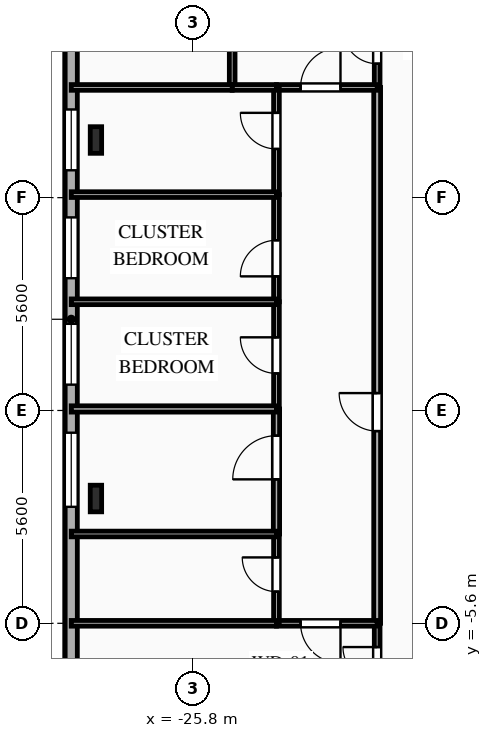
"""IFC4 building model, lengths in metres.
Left out: names, types, materials, properties, quantities, classifications, styles, units other than length and angle.
Written with IfcOpenShell. Run it as: python <this file> out.ifc"""

import sys

from ifc_helpers import new_model, si_unit, direction, frame, frame_2d, origin, origin_2d, place, context, subcontext, project, spatial, rectangle, i_section, extrude, element, fill, save


model = new_model("IFC4")
c1 = context("Model", 3, precision=1e-05, world=origin(), true_north=direction((0.0, 1.0)))
c2 = subcontext(c1, "Body", "Model", "MODEL_VIEW")
j1 = project(units=[si_unit("LENGTHUNIT", "METRE"), si_unit("PLANEANGLEUNIT", "RADIAN")], contexts=[c1])
p1 = place(None, origin())
s1 = spatial("IfcSite", under=j1, at=p1, CompositionType="ELEMENT")
p2 = place(p1, origin())
s2 = spatial("IfcBuilding", under=s1, at=p2, CompositionType="ELEMENT")
p3 = place(p2, frame((0.0, 0.0, 167.85)))
s3 = spatial("IfcBuildingStorey", under=s2, at=p3, CompositionType="ELEMENT", Elevation=167.85)
for number, where, z_axis, x_axis in (
    (1, (-28.35, 7.117, 0.0), (0.0, 0.0, 1.0), (1.0, 0.0, 0.0)),
    (2, (-28.35, -2.317, 0.0), (0.0, 0.0, 1.0), (1.0, 0.0, 0.0)),
):
    element("IfcColumn", number, at=place(p3, frame(where, z_axis=z_axis, x_axis=x_axis)), inside=s3, PredefinedType="COLUMN", context=c2, shape_type="SweptSolid", body=[
        extrude(i_section(OverallWidth=0.3, OverallDepth=0.7, WebThickness=0.017, FlangeThickness=0.032, FilletRadius=0.027, at=origin_2d()), origin(), (0.0, 0.0, 1.0), 3.35),
    ])
p4 = place(p3, frame((-29.0, -12.4, 0.0), z_axis=(0.0, 0.0, 1.0), x_axis=(0.0, 1.0, 0.0)))
e3 = element("IfcWall", 3, at=p4, inside=s3, PredefinedType="SOLIDWALL", context=c2, shape_type="SweptSolid", body=[
    extrude(rectangle(XDim=29.6, YDim=0.32, at=frame_2d((14.8, 0.0))), origin(), (0.0, 0.0, 1.0), 3.04),
])
p5 = place(p4, frame((2.855, 0.0, 0.85)))
e4 = element("IfcOpeningElement", 4, at=p5, cuts=e3, PredefinedType="OPENING", context=c2, shape_type="SweptSolid", body=[
    extrude(rectangle(XDim=1.65, YDim=1.85, at=frame_2d((0.825, 0.925))), frame((0.0, 0.17, 0.0), z_axis=(0.0, -1.0, 0.0), x_axis=(1.0, 0.0, 0.0)), (0.0, 0.0, 1.0), 0.34),
])
p6 = place(p4, frame((9.865, 0.0, 0.85)))
e5 = element("IfcOpeningElement", 5, at=p6, cuts=e3, PredefinedType="OPENING", context=c2, shape_type="SweptSolid", body=[
    extrude(rectangle(XDim=1.95, YDim=1.85, at=frame_2d((0.975, 0.925))), frame((0.0, 0.17, 0.0), z_axis=(0.0, -1.0, 0.0), x_axis=(1.0, 0.0, 0.0)), (0.0, 0.0, 1.0), 0.34),
])
p7 = place(p4, frame((13.08, 0.0, 0.85)))
e6 = element("IfcOpeningElement", 6, at=p7, cuts=e3, PredefinedType="OPENING", context=c2, shape_type="SweptSolid", body=[
    extrude(rectangle(XDim=1.6, YDim=1.85, at=frame_2d((0.8, 0.925))), frame((0.0, 0.17, 0.0), z_axis=(0.0, -1.0, 0.0), x_axis=(1.0, 0.0, 0.0)), (0.0, 0.0, 1.0), 0.34),
])
p8 = place(p4, frame((15.88, 0.0, 0.85)))
e7 = element("IfcOpeningElement", 7, at=p8, cuts=e3, PredefinedType="OPENING", context=c2, shape_type="SweptSolid", body=[
    extrude(rectangle(XDim=1.6, YDim=1.85, at=frame_2d((0.8, 0.925))), frame((0.0, 0.17, 0.0), z_axis=(0.0, -1.0, 0.0), x_axis=(1.0, 0.0, 0.0)), (0.0, 0.0, 1.0), 0.34),
])
p9 = place(p4, frame((18.72, 0.0, 0.85)))
e8 = element("IfcOpeningElement", 8, at=p9, cuts=e3, PredefinedType="OPENING", context=c2, shape_type="SweptSolid", body=[
    extrude(rectangle(XDim=1.6, YDim=1.85, at=frame_2d((0.8, 0.925))), frame((0.0, 0.17, 0.0), z_axis=(0.0, -1.0, 0.0), x_axis=(1.0, 0.0, 0.0)), (0.0, 0.0, 1.0), 0.34),
])
p10 = place(p4, frame((24.255, 0.0, 0.85)))
e9 = element("IfcOpeningElement", 9, at=p10, cuts=e3, PredefinedType="OPENING", context=c2, shape_type="SweptSolid", body=[
    extrude(rectangle(XDim=1.65, YDim=1.85, at=frame_2d((0.825, 0.925))), frame((0.0, 0.17, 0.0), z_axis=(0.0, -1.0, 0.0), x_axis=(1.0, 0.0, 0.0)), (0.0, 0.0, 1.0), 0.34),
])
p11 = place(p3, frame((-20.95, 8.5, 0.0), z_axis=(0.0, 0.0, 1.0), x_axis=(0.0, 1.0, 0.0)))
e10 = element("IfcWall", 10, at=p11, inside=s3, PredefinedType="PARTITIONING", context=c2, shape_type="SweptSolid", body=[
    extrude(rectangle(XDim=2.15, YDim=0.15, at=frame_2d((1.075, 0.0))), origin(), (0.0, 0.0, 1.0), 3.04),
])
p12 = place(p11, frame((0.625, 0.0, 0.0)))
e11 = element("IfcOpeningElement", 11, at=p12, cuts=e10, PredefinedType="OPENING", context=c2, shape_type="SweptSolid", body=[
    extrude(rectangle(XDim=0.9, YDim=2.1, at=frame_2d((0.45, 1.05))), frame((0.0, 0.085, 0.0), z_axis=(0.0, -1.0, 0.0), x_axis=(1.0, 0.0, 0.0)), (0.0, 0.0, 1.0), 0.17),
])
p13 = place(p3, frame((-20.95, -7.75, 0.0), z_axis=(0.0, 0.0, 1.0), x_axis=(0.0, 1.0, 0.0)))
e12 = element("IfcWall", 12, at=p13, inside=s3, PredefinedType="PARTITIONING", context=c2, shape_type="SweptSolid", body=[
    extrude(rectangle(XDim=2.15, YDim=0.15, at=frame_2d((1.075, 0.0))), origin(), (0.0, 0.0, 1.0), 3.04),
])
p14 = place(p13, frame((0.625, 0.0, 0.0)))
e13 = element("IfcOpeningElement", 13, at=p14, cuts=e12, PredefinedType="OPENING", context=c2, shape_type="SweptSolid", body=[
    extrude(rectangle(XDim=0.9, YDim=2.1, at=frame_2d((0.45, 1.05))), frame((0.0, 0.085, 0.0), z_axis=(0.0, -1.0, 0.0), x_axis=(1.0, 0.0, 0.0)), (0.0, 0.0, 1.0), 0.17),
])
p15 = place(p3, frame((-20.95, -5.6, 0.0), z_axis=(0.0, 0.0, 1.0), x_axis=(0.0, 1.0, 0.0)))
e14 = element("IfcWall", 14, at=p15, inside=s3, PredefinedType="PARTITIONING", context=c2, shape_type="SweptSolid", body=[
    extrude(rectangle(XDim=14.1, YDim=0.18, at=frame_2d((7.05, 0.0))), origin(), (0.0, 0.0, 1.0), 3.04),
])
p16 = place(p15, frame((5.058, 0.0, 0.0)))
e15 = element("IfcOpeningElement", 15, at=p16, cuts=e14, PredefinedType="OPENING", context=c2, shape_type="SweptSolid", body=[
    extrude(rectangle(XDim=1.0, YDim=2.15, at=frame_2d((0.5, 1.075))), frame((0.0, 0.1, 0.0), z_axis=(0.0, -1.0, 0.0), x_axis=(1.0, 0.0, 0.0)), (0.0, 0.0, 1.0), 0.2),
])
p17 = place(p3, frame((-23.6, 8.5, 0.0), z_axis=(0.0, 0.0, 1.0), x_axis=(1.0, 0.0, 0.0)))
e16 = element("IfcWall", 16, at=p17, inside=s3, PredefinedType="PARTITIONING", context=c2, shape_type="SweptSolid", body=[
    extrude(rectangle(XDim=2.65, YDim=0.15, at=frame_2d((1.325, 0.0))), origin(), (0.0, 0.0, 1.0), 3.04),
])
p18 = place(p17, frame((0.635, 0.0, 0.0)))
e17 = element("IfcOpeningElement", 17, at=p18, cuts=e16, PredefinedType="OPENING", context=c2, shape_type="SweptSolid", body=[
    extrude(rectangle(XDim=1.05, YDim=2.15, at=frame_2d((0.525, 1.075))), frame((0.0, 0.085, 0.0), z_axis=(0.0, -1.0, 0.0), x_axis=(1.0, 0.0, 0.0)), (0.0, 0.0, 1.0), 0.17),
])
p19 = place(p3, frame((-20.95, -5.6, 0.0), z_axis=(0.0, 0.0, 1.0), x_axis=(-1.0, 0.0, 0.0)))
e18 = element("IfcWall", 18, at=p19, inside=s3, PredefinedType="PARTITIONING", context=c2, shape_type="SweptSolid", body=[
    extrude(rectangle(XDim=2.65, YDim=0.15, at=frame_2d((1.325, 0.0))), origin(), (0.0, 0.0, 1.0), 3.04),
])
p20 = place(p19, frame((0.965, 0.0, 0.0)))
e19 = element("IfcOpeningElement", 19, at=p20, cuts=e18, PredefinedType="OPENING", context=c2, shape_type="SweptSolid", body=[
    extrude(rectangle(XDim=1.05, YDim=2.15, at=frame_2d((0.525, 1.075))), frame((0.0, 0.085, 0.0), z_axis=(0.0, -1.0, 0.0), x_axis=(1.0, 0.0, 0.0)), (0.0, 0.0, 1.0), 0.17),
])
p21 = place(p3, frame((-23.6, -5.6, 0.0), z_axis=(0.0, 0.0, 1.0), x_axis=(0.0, 1.0, 0.0)))
e20 = element("IfcWall", 20, at=p21, inside=s3, PredefinedType="PLUMBINGWALL", context=c2, shape_type="SweptSolid", body=[
    extrude(rectangle(XDim=2.35, YDim=0.15, at=frame_2d((1.175, 0.0))), origin(), (0.0, 0.0, 1.0), 2.695),
])
p22 = place(p21, frame((0.834, 0.0, 0.0)))
e21 = element("IfcOpeningElement", 21, at=p22, cuts=e20, PredefinedType="OPENING", context=c2, shape_type="SweptSolid", body=[
    extrude(rectangle(XDim=0.9, YDim=2.1, at=frame_2d((0.45, 1.05))), frame((0.0, 0.085, 0.0), z_axis=(0.0, -1.0, 0.0), x_axis=(1.0, 0.0, 0.0)), (0.0, 0.0, 1.0), 0.17),
])
p23 = place(p3, frame((-23.6, -3.25, 0.0), z_axis=(0.0, 0.0, 1.0), x_axis=(0.0, 1.0, 0.0)))
e22 = element("IfcWall", 22, at=p23, inside=s3, PredefinedType="PARTITIONING", context=c2, shape_type="SweptSolid", body=[
    extrude(rectangle(XDim=3.29, YDim=0.165, at=frame_2d((1.645, 0.0))), origin(), (0.0, 0.0, 1.0), 2.695),
])
p24 = place(p23, frame((1.438, 0.0, 0.0)))
e23 = element("IfcOpeningElement", 23, at=p24, cuts=e22, PredefinedType="OPENING", context=c2, shape_type="SweptSolid", body=[
    extrude(rectangle(XDim=1.15, YDim=2.15, at=frame_2d((0.575, 1.075))), frame((0.0, 0.093, 0.0), z_axis=(0.0, -1.0, 0.0), x_axis=(1.0, 0.0, 0.0)), (0.0, 0.0, 1.0), 0.185),
])
p25 = place(p3, frame((-23.6, 0.04, 0.0), z_axis=(0.0, 0.0, 1.0), x_axis=(0.0, 1.0, 0.0)))
e24 = element("IfcWall", 24, at=p25, inside=s3, PredefinedType="PARTITIONING", context=c2, shape_type="SweptSolid", body=[
    extrude(rectangle(XDim=2.82, YDim=0.15, at=frame_2d((1.41, 0.0))), origin(), (0.0, 0.0, 1.0), 2.695),
])
p26 = place(p25, frame((0.935, 0.0, 0.0)))
e25 = element("IfcOpeningElement", 25, at=p26, cuts=e24, PredefinedType="OPENING", context=c2, shape_type="SweptSolid", body=[
    extrude(rectangle(XDim=0.95, YDim=2.1, at=frame_2d((0.475, 1.05))), frame((0.0, 0.085, 0.0), z_axis=(0.0, -1.0, 0.0), x_axis=(1.0, 0.0, 0.0)), (0.0, 0.0, 1.0), 0.17),
])
p27 = place(p3, frame((-23.6, 2.86, 0.0), z_axis=(0.0, 0.0, 1.0), x_axis=(0.0, 1.0, 0.0)))
e26 = element("IfcWall", 26, at=p27, inside=s3, PredefinedType="PARTITIONING", context=c2, shape_type="SweptSolid", body=[
    extrude(rectangle(XDim=2.82, YDim=0.15, at=frame_2d((1.41, 0.0))), origin(), (0.0, 0.0, 1.0), 2.695),
])
p28 = place(p27, frame((0.669, 0.0, 0.0)))
e27 = element("IfcOpeningElement", 27, at=p28, cuts=e26, PredefinedType="OPENING", context=c2, shape_type="SweptSolid", body=[
    extrude(rectangle(XDim=0.95, YDim=2.1, at=frame_2d((0.475, 1.05))), frame((0.0, 0.085, 0.0), z_axis=(0.0, -1.0, 0.0), x_axis=(1.0, 0.0, 0.0)), (0.0, 0.0, 1.0), 0.17),
])
p29 = place(p3, frame((-23.6, 5.68, 0.0), z_axis=(0.0, 0.0, 1.0), x_axis=(0.0, 1.0, 0.0)))
e28 = element("IfcWall", 28, at=p29, inside=s3, PredefinedType="PARTITIONING", context=c2, shape_type="SweptSolid", body=[
    extrude(rectangle(XDim=2.82, YDim=0.15, at=frame_2d((1.41, 0.0))), origin(), (0.0, 0.0, 1.0), 2.695),
])
p30 = place(p29, frame((1.201, 0.0, 0.0)))
e29 = element("IfcOpeningElement", 29, at=p30, cuts=e28, PredefinedType="OPENING", context=c2, shape_type="SweptSolid", body=[
    extrude(rectangle(XDim=0.95, YDim=2.1, at=frame_2d((0.475, 1.05))), frame((0.0, 0.085, 0.0), z_axis=(0.0, -1.0, 0.0), x_axis=(1.0, 0.0, 0.0)), (0.0, 0.0, 1.0), 0.17),
])
p31 = place(p3, frame((-24.765, 8.5, 0.0), z_axis=(0.0, 0.0, 1.0), x_axis=(0.0, 1.0, 0.0)))
e30 = element("IfcWall", 30, at=p31, inside=s3, PredefinedType="PARTITIONING", context=c2, shape_type="SweptSolid", body=[
    extrude(rectangle(XDim=11.9, YDim=0.15, at=frame_2d((5.95, 0.0))), origin(), (0.0, 0.0, 1.0), 3.04),
])
p32 = place(p31, frame((3.002, 0.0, 0.0)))
e31 = element("IfcOpeningElement", 31, at=p32, cuts=e30, PredefinedType="OPENING", context=c2, shape_type="SweptSolid", body=[
    extrude(rectangle(XDim=1.05, YDim=2.15, at=frame_2d((0.525, 1.075))), frame((0.0, 0.085, 0.0), z_axis=(0.0, -1.0, 0.0), x_axis=(1.0, 0.0, 0.0)), (0.0, 0.0, 1.0), 0.17),
])
p33 = place(p3, frame((-23.6, 8.5, 0.0), z_axis=(0.0, 0.0, 1.0), x_axis=(-1.0, 0.0, 0.0)))
e32 = element("IfcWall", 32, at=p33, inside=s3, PredefinedType="PARTITIONING", context=c2, shape_type="SweptSolid", body=[
    extrude(rectangle(XDim=1.165, YDim=0.15, at=frame_2d((0.583, 0.0))), origin(), (0.0, 0.0, 1.0), 3.04),
])
p34 = place(p3, frame((-24.765, 8.5, 0.0), z_axis=(0.0, 0.0, 1.0), x_axis=(-1.0, 0.0, 0.0)))
e33 = element("IfcWall", 33, at=p34, inside=s3, PredefinedType="PARTITIONING", context=c2, shape_type="SweptSolid", body=[
    extrude(rectangle(XDim=4.235, YDim=0.15, at=frame_2d((2.118, 0.0))), origin(), (0.0, 0.0, 1.0), 3.04),
])
for number, where, z_axis, x_axis in (
    (34, (-29.0, -5.6, 0.0), (0.0, 0.0, 1.0), (1.0, 0.0, 0.0)),
    (35, (-29.0, -3.25, 0.0), (0.0, 0.0, 1.0), (1.0, 0.0, 0.0)),
):
    element("IfcWall", number, at=place(p3, frame(where, z_axis=z_axis, x_axis=x_axis)), inside=s3, PredefinedType="PLUMBINGWALL", context=c2, shape_type="SweptSolid", body=[
        extrude(rectangle(XDim=5.4, YDim=0.15, at=frame_2d((2.7, 0.0))), origin(), (0.0, 0.0, 1.0), 3.04),
    ])
p35 = place(p3, frame((-29.0, 0.04, 0.0), z_axis=(0.0, 0.0, 1.0), x_axis=(1.0, 0.0, 0.0)))
e36 = element("IfcWall", 36, at=p35, inside=s3, PredefinedType="PARTITIONING", context=c2, shape_type="SweptSolid", body=[
    extrude(rectangle(XDim=5.4, YDim=0.165, at=frame_2d((2.7, 0.0))), origin(), (0.0, 0.0, 1.0), 3.04),
])
for number, where, z_axis, x_axis in (
    (37, (-29.0, 2.86, 0.0), (0.0, 0.0, 1.0), (1.0, 0.0, 0.0)),
    (38, (-29.0, 5.68, 0.0), (0.0, 0.0, 1.0), (1.0, 0.0, 0.0)),
):
    element("IfcWall", number, at=place(p3, frame(where, z_axis=z_axis, x_axis=x_axis)), inside=s3, PredefinedType="PARTITIONING", context=c2, shape_type="SweptSolid", body=[
        extrude(rectangle(XDim=5.4, YDim=0.15, at=frame_2d((2.7, 0.0))), origin(), (0.0, 0.0, 1.0), 3.04),
    ])
p36 = place(p6, origin())
e39 = element("IfcWindow", 39, at=p36, inside=s3, PartitioningType="SINGLE_PANEL", PredefinedType="WINDOW", context=c2, shape_type="SweptSolid", body=[
    extrude(rectangle(XDim=1.95, YDim=1.85, at=frame_2d((0.975, 0.925))), frame((0.0, 0.03, 0.0), z_axis=(0.0, -1.0, 0.0), x_axis=(1.0, 0.0, 0.0)), (0.0, 0.0, 1.0), 0.06),
])
fill(e5, e39)
p37 = place(p7, origin())
e40 = element("IfcWindow", 40, at=p37, inside=s3, PartitioningType="SINGLE_PANEL", PredefinedType="WINDOW", context=c2, shape_type="SweptSolid", body=[
    extrude(rectangle(XDim=1.6, YDim=1.85, at=frame_2d((0.8, 0.925))), frame((0.0, 0.03, 0.0), z_axis=(0.0, -1.0, 0.0), x_axis=(1.0, 0.0, 0.0)), (0.0, 0.0, 1.0), 0.06),
])
fill(e6, e40)
p38 = place(p8, origin())
e41 = element("IfcWindow", 41, at=p38, inside=s3, PartitioningType="SINGLE_PANEL", PredefinedType="WINDOW", context=c2, shape_type="SweptSolid", body=[
    extrude(rectangle(XDim=1.6, YDim=1.85, at=frame_2d((0.8, 0.925))), frame((0.0, 0.03, 0.0), z_axis=(0.0, -1.0, 0.0), x_axis=(1.0, 0.0, 0.0)), (0.0, 0.0, 1.0), 0.06),
])
fill(e7, e41)
p39 = place(p9, origin())
e42 = element("IfcWindow", 42, at=p39, inside=s3, PartitioningType="SINGLE_PANEL", PredefinedType="WINDOW", context=c2, shape_type="SweptSolid", body=[
    extrude(rectangle(XDim=1.6, YDim=1.85, at=frame_2d((0.8, 0.925))), frame((0.0, 0.03, 0.0), z_axis=(0.0, -1.0, 0.0), x_axis=(1.0, 0.0, 0.0)), (0.0, 0.0, 1.0), 0.06),
])
fill(e8, e42)
p40 = place(p12, origin())
e43 = element("IfcDoor", 43, at=p40, inside=s3, OperationType="SINGLE_SWING_RIGHT", PredefinedType="DOOR", context=c2, shape_type="SweptSolid", body=[
    extrude(rectangle(XDim=0.9, YDim=2.1, at=frame_2d((0.45, 1.05))), frame((0.0, 0.025, 0.0), z_axis=(0.0, -1.0, 0.0), x_axis=(1.0, 0.0, 0.0)), (0.0, 0.0, 1.0), 0.05),
])
fill(e11, e43)
p41 = place(p14, origin())
e44 = element("IfcDoor", 44, at=p41, inside=s3, OperationType="SINGLE_SWING_RIGHT", PredefinedType="DOOR", context=c2, shape_type="SweptSolid", body=[
    extrude(rectangle(XDim=0.9, YDim=2.1, at=frame_2d((0.45, 1.05))), frame((0.0, 0.025, 0.0), z_axis=(0.0, -1.0, 0.0), x_axis=(1.0, 0.0, 0.0)), (0.0, 0.0, 1.0), 0.05),
])
fill(e13, e44)
p42 = place(p16, origin())
e45 = element("IfcDoor", 45, at=p42, inside=s3, OperationType="SINGLE_SWING_RIGHT", PredefinedType="DOOR", context=c2, shape_type="SweptSolid", body=[
    extrude(rectangle(XDim=1.0, YDim=2.15, at=frame_2d((0.5, 1.075))), frame((0.0, 0.025, 0.0), z_axis=(0.0, -1.0, 0.0), x_axis=(1.0, 0.0, 0.0)), (0.0, 0.0, 1.0), 0.05),
])
fill(e15, e45)
p43 = place(p18, origin())
e46 = element("IfcDoor", 46, at=p43, inside=s3, OperationType="SINGLE_SWING_RIGHT", PredefinedType="DOOR", context=c2, shape_type="SweptSolid", body=[
    extrude(rectangle(XDim=1.05, YDim=2.15, at=frame_2d((0.525, 1.075))), frame((0.0, 0.025, 0.0), z_axis=(0.0, -1.0, 0.0), x_axis=(1.0, 0.0, 0.0)), (0.0, 0.0, 1.0), 0.05),
])
fill(e17, e46)
p44 = place(p20, origin())
e47 = element("IfcDoor", 47, at=p44, inside=s3, OperationType="SINGLE_SWING_LEFT", PredefinedType="DOOR", context=c2, shape_type="SweptSolid", body=[
    extrude(rectangle(XDim=1.05, YDim=2.15, at=frame_2d((0.525, 1.075))), frame((0.0, 0.025, 0.0), z_axis=(0.0, -1.0, 0.0), x_axis=(1.0, 0.0, 0.0)), (0.0, 0.0, 1.0), 0.05),
])
fill(e19, e47)
p45 = place(p22, origin())
e48 = element("IfcDoor", 48, at=p45, inside=s3, OperationType="SINGLE_SWING_RIGHT", PredefinedType="DOOR", context=c2, shape_type="SweptSolid", body=[
    extrude(rectangle(XDim=0.9, YDim=2.1, at=frame_2d((0.45, 1.05))), frame((0.0, 0.025, 0.0), z_axis=(0.0, -1.0, 0.0), x_axis=(1.0, 0.0, 0.0)), (0.0, 0.0, 1.0), 0.05),
])
fill(e21, e48)
p46 = place(p24, origin())
e49 = element("IfcDoor", 49, at=p46, inside=s3, OperationType="SINGLE_SWING_LEFT", PredefinedType="DOOR", context=c2, shape_type="SweptSolid", body=[
    extrude(rectangle(XDim=1.15, YDim=2.15, at=frame_2d((0.575, 1.075))), frame((0.0, 0.025, 0.0), z_axis=(0.0, -1.0, 0.0), x_axis=(1.0, 0.0, 0.0)), (0.0, 0.0, 1.0), 0.05),
])
fill(e23, e49)
p47 = place(p26, origin())
e50 = element("IfcDoor", 50, at=p47, inside=s3, OperationType="SINGLE_SWING_RIGHT", PredefinedType="DOOR", context=c2, shape_type="SweptSolid", body=[
    extrude(rectangle(XDim=0.95, YDim=2.1, at=frame_2d((0.475, 1.05))), frame((0.0, 0.025, 0.0), z_axis=(0.0, -1.0, 0.0), x_axis=(1.0, 0.0, 0.0)), (0.0, 0.0, 1.0), 0.05),
])
fill(e25, e50)
p48 = place(p28, origin())
e51 = element("IfcDoor", 51, at=p48, inside=s3, OperationType="SINGLE_SWING_LEFT", PredefinedType="DOOR", context=c2, shape_type="SweptSolid", body=[
    extrude(rectangle(XDim=0.95, YDim=2.1, at=frame_2d((0.475, 1.05))), frame((0.0, 0.025, 0.0), z_axis=(0.0, -1.0, 0.0), x_axis=(1.0, 0.0, 0.0)), (0.0, 0.0, 1.0), 0.05),
])
fill(e27, e51)
p49 = place(p30, origin())
e52 = element("IfcDoor", 52, at=p49, inside=s3, OperationType="SINGLE_SWING_RIGHT", PredefinedType="DOOR", context=c2, shape_type="SweptSolid", body=[
    extrude(rectangle(XDim=0.95, YDim=2.1, at=frame_2d((0.475, 1.05))), frame((0.0, 0.025, 0.0), z_axis=(0.0, -1.0, 0.0), x_axis=(1.0, 0.0, 0.0)), (0.0, 0.0, 1.0), 0.05),
])
fill(e29, e52)
save(model, sys.argv[1])
